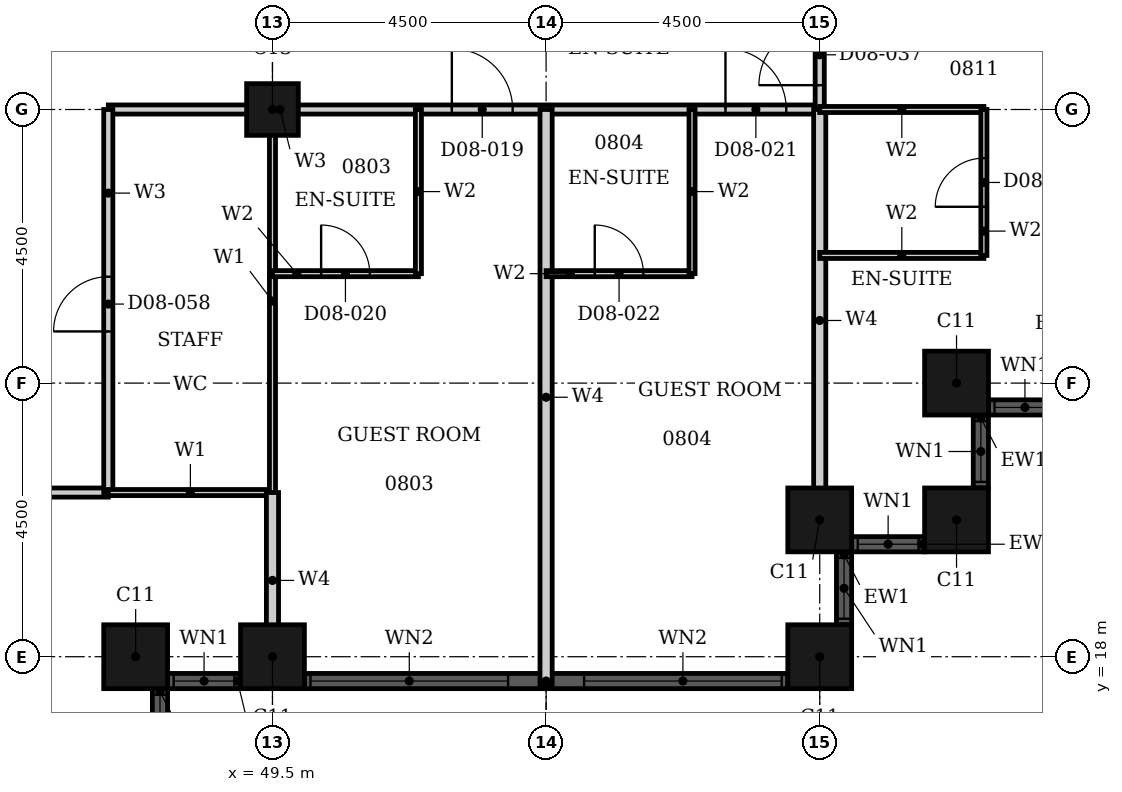
"""IFC4 building model, lengths in metres.
Left out: names, types, materials, properties, quantities, classifications, styles, units other than length and angle.
Written with IfcOpenShell. Run it as: python <this file> out.ifc"""

import sys

from ifc_helpers import new_model, si_unit, direction, frame, frame_2d, origin, origin_2d, place, context, subcontext, project, spatial, rectangle, hollow_rectangle, extrude, element, fill, save


model = new_model("IFC4")
c1 = context("Model", 3, precision=1e-05, world=origin(), true_north=direction((0.0, 1.0)))
c2 = subcontext(c1, "Body", "Model", "MODEL_VIEW")
j1 = project(units=[si_unit("LENGTHUNIT", "METRE"), si_unit("PLANEANGLEUNIT", "RADIAN")], contexts=[c1])
p1 = place(None, origin())
s1 = spatial("IfcSite", under=j1, at=p1, CompositionType="ELEMENT")
p2 = place(p1, origin())
s2 = spatial("IfcBuilding", under=s1, at=p2, CompositionType="ELEMENT")
p3 = place(p2, frame((0.0, 0.0, 40.8)))
s3 = spatial("IfcBuildingStorey", under=s2, at=p3, CompositionType="ELEMENT", Elevation=40.8)
for number, where, z_axis, x_axis in (
    (1, (47.25, 18.0, 0.0), (0.0, 0.0, 1.0), (1.0, 0.0, 0.0)),
    (2, (49.5, 18.0, 0.0), (0.0, 0.0, 1.0), (1.0, 0.0, 0.0)),
    (3, (58.5, 18.0, 0.0), (0.0, 0.0, 1.0), (1.0, 0.0, 0.0)),
    (4, (58.5, 20.25, 0.0), (0.0, 0.0, 1.0), (1.0, 0.0, 0.0)),
    (5, (60.75, 20.25, 0.0), (0.0, 0.0, 1.0), (1.0, 0.0, 0.0)),
    (6, (60.75, 22.5, 0.0), (0.0, 0.0, 1.0), (1.0, 0.0, 0.0)),
):
    element("IfcColumn", number, at=place(p3, frame(where, z_axis=z_axis, x_axis=x_axis)), inside=s3, PredefinedType="COLUMN", context=c2, shape_type="SweptSolid", body=[
        extrude(hollow_rectangle(XDim=1.05, YDim=1.05, WallThickness=0.034, at=origin_2d()), origin(), (0.0, 0.0, 1.0), 3.6),
    ])
p4 = place(p3, frame((49.5, 27.0, 0.0), z_axis=(0.0, 0.0, 1.0), x_axis=(1.0, 0.0, 0.0)))
e7 = element("IfcColumn", 7, at=p4, inside=s3, PredefinedType="COLUMN", context=c2, shape_type="SweptSolid", body=[
    extrude(hollow_rectangle(XDim=0.85, YDim=0.85, WallThickness=0.026, at=origin_2d()), origin(), (0.0, 0.0, 1.0), 3.6),
])
p5 = place(p3, frame((47.65, 16.275, 0.0), z_axis=(0.0, 0.0, 1.0), x_axis=(0.0, 1.0, 0.0)))
e8 = element("IfcWall", 8, at=p5, inside=s3, PredefinedType="SOLIDWALL", context=c2, shape_type="SweptSolid", body=[
    extrude(rectangle(XDim=1.2, YDim=0.25, at=frame_2d((0.6, 0.0))), origin(), (0.0, 0.0, 1.0), 3.6),
])
p6 = place(p5, frame((0.1, 0.0, 0.9)))
e9 = element("IfcOpeningElement", 9, at=p6, cuts=e8, PredefinedType="OPENING", context=c2, shape_type="SweptSolid", body=[
    extrude(rectangle(XDim=1.0, YDim=2.08, at=frame_2d((0.5, 1.04))), frame((0.0, 0.135, 0.0), z_axis=(0.0, -1.0, 0.0), x_axis=(1.0, 0.0, 0.0)), (0.0, 0.0, 1.0), 0.27),
])
p7 = place(p3, frame((47.775, 17.6, 0.0), z_axis=(0.0, 0.0, 1.0), x_axis=(1.0, 0.0, 0.0)))
e10 = element("IfcWall", 10, at=p7, inside=s3, PredefinedType="SOLIDWALL", context=c2, shape_type="SweptSolid", body=[
    extrude(rectangle(XDim=1.2, YDim=0.25, at=frame_2d((0.6, 0.0))), origin(), (0.0, 0.0, 1.0), 3.6),
])
p8 = place(p7, frame((0.1, 0.0, 0.9)))
e11 = element("IfcOpeningElement", 11, at=p8, cuts=e10, PredefinedType="OPENING", context=c2, shape_type="SweptSolid", body=[
    extrude(rectangle(XDim=1.0, YDim=2.08, at=frame_2d((0.5, 1.04))), frame((0.0, 0.135, 0.0), z_axis=(0.0, -1.0, 0.0), x_axis=(1.0, 0.0, 0.0)), (0.0, 0.0, 1.0), 0.27),
])
p9 = place(p3, frame((50.025, 17.6, 0.0), z_axis=(0.0, 0.0, 1.0), x_axis=(1.0, 0.0, 0.0)))
e12 = element("IfcWall", 12, at=p9, inside=s3, PredefinedType="SOLIDWALL", context=c2, shape_type="SweptSolid", body=[
    extrude(rectangle(XDim=7.95, YDim=0.25, at=frame_2d((3.975, 0.0))), origin(), (0.0, 0.0, 1.0), 3.6),
])
p10 = place(p9, frame((0.1, 0.0, 0.9)))
e13 = element("IfcOpeningElement", 13, at=p10, cuts=e12, PredefinedType="OPENING", context=c2, shape_type="SweptSolid", body=[
    extrude(rectangle(XDim=3.25, YDim=2.08, at=frame_2d((1.625, 1.04))), frame((0.0, 0.135, 0.0), z_axis=(0.0, -1.0, 0.0), x_axis=(1.0, 0.0, 0.0)), (0.0, 0.0, 1.0), 0.27),
])
p11 = place(p9, frame((4.6, 0.0, 0.9)))
e14 = element("IfcOpeningElement", 14, at=p11, cuts=e12, PredefinedType="OPENING", context=c2, shape_type="SweptSolid", body=[
    extrude(rectangle(XDim=3.25, YDim=2.08, at=frame_2d((1.625, 1.04))), frame((0.0, 0.135, 0.0), z_axis=(0.0, -1.0, 0.0), x_axis=(1.0, 0.0, 0.0)), (0.0, 0.0, 1.0), 0.27),
])
p12 = place(p3, frame((58.9, 18.525, 0.0), z_axis=(0.0, 0.0, 1.0), x_axis=(0.0, 1.0, 0.0)))
e15 = element("IfcWall", 15, at=p12, inside=s3, PredefinedType="SOLIDWALL", context=c2, shape_type="SweptSolid", body=[
    extrude(rectangle(XDim=1.2, YDim=0.25, at=frame_2d((0.6, 0.0))), origin(), (0.0, 0.0, 1.0), 3.6),
])
p13 = place(p12, frame((0.1, 0.0, 0.9)))
e16 = element("IfcOpeningElement", 16, at=p13, cuts=e15, PredefinedType="OPENING", context=c2, shape_type="SweptSolid", body=[
    extrude(rectangle(XDim=1.0, YDim=2.08, at=frame_2d((0.5, 1.04))), frame((0.0, 0.135, 0.0), z_axis=(0.0, -1.0, 0.0), x_axis=(1.0, 0.0, 0.0)), (0.0, 0.0, 1.0), 0.27),
])
p14 = place(p3, frame((59.025, 19.85, 0.0), z_axis=(0.0, 0.0, 1.0), x_axis=(1.0, 0.0, 0.0)))
e17 = element("IfcWall", 17, at=p14, inside=s3, PredefinedType="SOLIDWALL", context=c2, shape_type="SweptSolid", body=[
    extrude(rectangle(XDim=1.2, YDim=0.25, at=frame_2d((0.6, 0.0))), origin(), (0.0, 0.0, 1.0), 3.6),
])
p15 = place(p14, frame((0.1, 0.0, 0.9)))
e18 = element("IfcOpeningElement", 18, at=p15, cuts=e17, PredefinedType="OPENING", context=c2, shape_type="SweptSolid", body=[
    extrude(rectangle(XDim=1.0, YDim=2.08, at=frame_2d((0.5, 1.04))), frame((0.0, 0.135, 0.0), z_axis=(0.0, -1.0, 0.0), x_axis=(1.0, 0.0, 0.0)), (0.0, 0.0, 1.0), 0.27),
])
p16 = place(p3, frame((61.15, 20.775, 0.0), z_axis=(0.0, 0.0, 1.0), x_axis=(0.0, 1.0, 0.0)))
e19 = element("IfcWall", 19, at=p16, inside=s3, PredefinedType="SOLIDWALL", context=c2, shape_type="SweptSolid", body=[
    extrude(rectangle(XDim=1.2, YDim=0.25, at=frame_2d((0.6, 0.0))), origin(), (0.0, 0.0, 1.0), 3.6),
])
p17 = place(p16, frame((0.1, 0.0, 0.9)))
e20 = element("IfcOpeningElement", 20, at=p17, cuts=e19, PredefinedType="OPENING", context=c2, shape_type="SweptSolid", body=[
    extrude(rectangle(XDim=1.0, YDim=2.08, at=frame_2d((0.5, 1.04))), frame((0.0, 0.135, 0.0), z_axis=(0.0, -1.0, 0.0), x_axis=(1.0, 0.0, 0.0)), (0.0, 0.0, 1.0), 0.27),
])
p18 = place(p3, frame((61.275, 22.1, 0.0), z_axis=(0.0, 0.0, 1.0), x_axis=(1.0, 0.0, 0.0)))
e21 = element("IfcWall", 21, at=p18, inside=s3, PredefinedType="SOLIDWALL", context=c2, shape_type="SweptSolid", body=[
    extrude(rectangle(XDim=1.2, YDim=0.25, at=frame_2d((0.6, 0.0))), origin(), (0.0, 0.0, 1.0), 3.6),
])
p19 = place(p18, frame((0.1, 0.0, 0.9)))
e22 = element("IfcOpeningElement", 22, at=p19, cuts=e21, PredefinedType="OPENING", context=c2, shape_type="SweptSolid", body=[
    extrude(rectangle(XDim=1.0, YDim=2.08, at=frame_2d((0.5, 1.04))), frame((0.0, 0.135, 0.0), z_axis=(0.0, -1.0, 0.0), x_axis=(1.0, 0.0, 0.0)), (0.0, 0.0, 1.0), 0.27),
])
p20 = place(p3, frame((31.5, 20.7, 0.0), z_axis=(0.0, 0.0, 1.0), x_axis=(1.0, 0.0, 0.0)))
e23 = element("IfcWall", 23, at=p20, inside=s3, PredefinedType="PARTITIONING", context=c2, shape_type="SweptSolid", body=[
    extrude(rectangle(XDim=15.3, YDim=0.15, at=frame_2d((7.65, 0.0))), origin(), (0.0, 0.0, 1.0), 3.3),
])
p21 = place(p20, frame((11.95, 0.0, 0.0)))
e24 = element("IfcOpeningElement", 24, at=p21, cuts=e23, PredefinedType="OPENING", context=c2, shape_type="SweptSolid", body=[
    extrude(rectangle(XDim=1.0, YDim=2.1, at=frame_2d((0.5, 1.05))), frame((0.0, 0.085, 0.0), z_axis=(0.0, -1.0, 0.0), x_axis=(1.0, 0.0, 0.0)), (0.0, 0.0, 1.0), 0.17),
])
p22 = place(p20, frame((1.05, 0.0, 0.0)))
e25 = element("IfcOpeningElement", 25, at=p22, cuts=e23, PredefinedType="OPENING", context=c2, shape_type="SweptSolid", body=[
    extrude(rectangle(XDim=0.9, YDim=2.1, at=frame_2d((0.45, 1.05))), frame((0.0, 0.085, 0.0), z_axis=(0.0, -1.0, 0.0), x_axis=(1.0, 0.0, 0.0)), (0.0, 0.0, 1.0), 0.17),
])
p23 = place(p20, frame((5.55, 0.0, 0.0)))
e26 = element("IfcOpeningElement", 26, at=p23, cuts=e23, PredefinedType="OPENING", context=c2, shape_type="SweptSolid", body=[
    extrude(rectangle(XDim=0.9, YDim=2.1, at=frame_2d((0.45, 1.05))), frame((0.0, 0.085, 0.0), z_axis=(0.0, -1.0, 0.0), x_axis=(1.0, 0.0, 0.0)), (0.0, 0.0, 1.0), 0.17),
])
p24 = place(p3, frame((46.8, 27.0, 0.0), z_axis=(0.0, 0.0, 1.0), x_axis=(1.0, 0.0, 0.0)))
e27 = element("IfcWall", 27, at=p24, inside=s3, PredefinedType="PARTITIONING", context=c2, shape_type="SweptSolid", body=[
    extrude(rectangle(XDim=11.7, YDim=0.15, at=frame_2d((5.85, 0.0))), origin(), (0.0, 0.0, 1.0), 2.58),
])
p25 = place(p24, frame((5.65, 0.0, 0.0)))
e28 = element("IfcOpeningElement", 28, at=p25, cuts=e27, PredefinedType="OPENING", context=c2, shape_type="SweptSolid", body=[
    extrude(rectangle(XDim=1.0, YDim=2.1, at=frame_2d((0.5, 1.05))), frame((0.0, 0.085, 0.0), z_axis=(0.0, -1.0, 0.0), x_axis=(1.0, 0.0, 0.0)), (0.0, 0.0, 1.0), 0.17),
])
p26 = place(p24, frame((10.15, 0.0, 0.0)))
e29 = element("IfcOpeningElement", 29, at=p26, cuts=e27, PredefinedType="OPENING", context=c2, shape_type="SweptSolid", body=[
    extrude(rectangle(XDim=1.0, YDim=2.1, at=frame_2d((0.5, 1.05))), frame((0.0, 0.085, 0.0), z_axis=(0.0, -1.0, 0.0), x_axis=(1.0, 0.0, 0.0)), (0.0, 0.0, 1.0), 0.17),
])
p27 = place(p3, frame((46.8, 20.7, 0.0), z_axis=(0.0, 0.0, 1.0), x_axis=(0.0, 1.0, 0.0)))
e30 = element("IfcWall", 30, at=p27, inside=s3, PredefinedType="PARTITIONING", context=c2, shape_type="SweptSolid", body=[
    extrude(rectangle(XDim=6.3, YDim=0.15, at=frame_2d((3.15, 0.0))), origin(), (0.0, 0.0, 1.0), 3.3),
])
p28 = place(p27, frame((2.65, 0.0, 0.0)))
e31 = element("IfcOpeningElement", 31, at=p28, cuts=e30, PredefinedType="OPENING", context=c2, shape_type="SweptSolid", body=[
    extrude(rectangle(XDim=0.9, YDim=2.1, at=frame_2d((0.45, 1.05))), frame((0.0, 0.085, 0.0), z_axis=(0.0, -1.0, 0.0), x_axis=(1.0, 0.0, 0.0)), (0.0, 0.0, 1.0), 0.17),
])
p29 = place(p3, frame((58.5, 27.0, 0.0), z_axis=(0.0, 0.0, 1.0), x_axis=(0.0, 1.0, 0.0)))
e32 = element("IfcWall", 32, at=p29, inside=s3, PredefinedType="PARTITIONING", context=c2, shape_type="SweptSolid", body=[
    extrude(rectangle(XDim=1.8, YDim=0.15, at=frame_2d((0.9, 0.0))), origin(), (0.0, 0.0, 1.0), 3.3),
])
p30 = place(p29, frame((0.4, 0.0, 0.0)))
e33 = element("IfcOpeningElement", 33, at=p30, cuts=e32, PredefinedType="OPENING", context=c2, shape_type="SweptSolid", body=[
    extrude(rectangle(XDim=1.0, YDim=2.1, at=frame_2d((0.5, 1.05))), frame((0.0, 0.085, 0.0), z_axis=(0.0, -1.0, 0.0), x_axis=(1.0, 0.0, 0.0)), (0.0, 0.0, 1.0), 0.17),
])
p31 = place(p3, frame((46.8, 20.7, 0.0), z_axis=(0.0, 0.0, 1.0), x_axis=(1.0, 0.0, 0.0)))
e34 = element("IfcWall", 34, at=p31, inside=s3, PredefinedType="PARTITIONING", context=c2, shape_type="SweptSolid", body=[
    extrude(rectangle(XDim=2.7, YDim=0.1, at=frame_2d((1.35, 0.0))), origin(), (0.0, 0.0, 1.0), 3.3),
])
p32 = place(p3, frame((49.5, 20.7, 0.0), z_axis=(0.0, 0.0, 1.0), x_axis=(0.0, 1.0, 0.0)))
e35 = element("IfcWall", 35, at=p32, inside=s3, PredefinedType="PARTITIONING", context=c2, shape_type="SweptSolid", body=[
    extrude(rectangle(XDim=6.3, YDim=0.1, at=frame_2d((3.15, 0.0))), origin(), (0.0, 0.0, 1.0), 2.38),
])
p33 = place(p3, frame((49.5, 17.81, 0.0), z_axis=(0.0, 0.0, 1.0), x_axis=(0.0, 1.0, 0.0)))
e36 = element("IfcWall", 36, at=p33, inside=s3, PredefinedType="PARTITIONING", context=c2, shape_type="SweptSolid", body=[
    extrude(rectangle(XDim=2.89, YDim=0.2, at=frame_2d((1.445, 0.0))), origin(), (0.0, 0.0, 1.0), 2.38),
])
p34 = place(p3, frame((54.0, 17.535, 0.0), z_axis=(0.0, 0.0, 1.0), x_axis=(0.0, 1.0, 0.0)))
e37 = element("IfcWall", 37, at=p34, inside=s3, PredefinedType="PARTITIONING", context=c2, shape_type="SweptSolid", body=[
    extrude(rectangle(XDim=9.465, YDim=0.2, at=frame_2d((4.732, 0.0))), origin(), (0.0, 0.0, 1.0), 3.3),
])
p35 = place(p3, frame((58.5, 20.06, 0.0), z_axis=(0.0, 0.0, 1.0), x_axis=(0.0, 1.0, 0.0)))
e38 = element("IfcWall", 38, at=p35, inside=s3, PredefinedType="PARTITIONING", context=c2, shape_type="SweptSolid", body=[
    extrude(rectangle(XDim=6.94, YDim=0.2, at=frame_2d((3.47, 0.0))), origin(), (0.0, 0.0, 1.0), 3.3),
])
p36 = place(p3, frame((49.5, 24.3, 0.0), z_axis=(0.0, 0.0, 1.0), x_axis=(1.0, 0.0, 0.0)))
e39 = element("IfcWall", 39, at=p36, inside=s3, PredefinedType="PARTITIONING", context=c2, shape_type="SweptSolid", body=[
    extrude(rectangle(XDim=2.4, YDim=0.1, at=frame_2d((1.2, 0.0))), origin(), (0.0, 0.0, 1.0), 3.3),
])
p37 = place(p36, frame((0.8, 0.0, 0.0)))
e40 = element("IfcOpeningElement", 40, at=p37, cuts=e39, PredefinedType="OPENING", context=c2, shape_type="SweptSolid", body=[
    extrude(rectangle(XDim=0.8, YDim=2.1, at=frame_2d((0.4, 1.05))), frame((0.0, 0.06, 0.0), z_axis=(0.0, -1.0, 0.0), x_axis=(1.0, 0.0, 0.0)), (0.0, 0.0, 1.0), 0.12),
])
p38 = place(p3, frame((54.0, 24.3, 0.0), z_axis=(0.0, 0.0, 1.0), x_axis=(1.0, 0.0, 0.0)))
e41 = element("IfcWall", 41, at=p38, inside=s3, PredefinedType="PARTITIONING", context=c2, shape_type="SweptSolid", body=[
    extrude(rectangle(XDim=2.4, YDim=0.1, at=frame_2d((1.2, 0.0))), origin(), (0.0, 0.0, 1.0), 3.3),
])
p39 = place(p38, frame((0.8, 0.0, 0.0)))
e42 = element("IfcOpeningElement", 42, at=p39, cuts=e41, PredefinedType="OPENING", context=c2, shape_type="SweptSolid", body=[
    extrude(rectangle(XDim=0.8, YDim=2.1, at=frame_2d((0.4, 1.05))), frame((0.0, 0.06, 0.0), z_axis=(0.0, -1.0, 0.0), x_axis=(1.0, 0.0, 0.0)), (0.0, 0.0, 1.0), 0.12),
])
p40 = place(p3, frame((58.5, 24.6, 0.0), z_axis=(0.0, 0.0, 1.0), x_axis=(1.0, 0.0, 0.0)))
e43 = element("IfcWall", 43, at=p40, inside=s3, PredefinedType="PARTITIONING", context=c2, shape_type="SweptSolid", body=[
    extrude(rectangle(XDim=2.7, YDim=0.1, at=frame_2d((1.35, 0.0))), origin(), (0.0, 0.0, 1.0), 3.3),
])
p41 = place(p3, frame((58.5, 27.0, 0.0), z_axis=(0.0, 0.0, 1.0), x_axis=(1.0, 0.0, 0.0)))
e44 = element("IfcWall", 44, at=p41, inside=s3, PredefinedType="PARTITIONING", context=c2, shape_type="SweptSolid", body=[
    extrude(rectangle(XDim=2.7, YDim=0.1, at=frame_2d((1.35, 0.0))), origin(), (0.0, 0.0, 1.0), 2.58),
])
for number, where, z_axis, x_axis in (
    (45, (51.9, 24.3, 0.0), (0.0, 0.0, 1.0), (0.0, 1.0, 0.0)),
    (46, (56.4, 24.3, 0.0), (0.0, 0.0, 1.0), (0.0, 1.0, 0.0)),
):
    element("IfcWall", number, at=place(p3, frame(where, z_axis=z_axis, x_axis=x_axis)), inside=s3, PredefinedType="PARTITIONING", context=c2, shape_type="SweptSolid", body=[
        extrude(rectangle(XDim=2.7, YDim=0.1, at=frame_2d((1.35, 0.0))), origin(), (0.0, 0.0, 1.0), 3.3),
    ])
p42 = place(p3, frame((61.2, 24.6, 0.0), z_axis=(0.0, 0.0, 1.0), x_axis=(0.0, 1.0, 0.0)))
e47 = element("IfcWall", 47, at=p42, inside=s3, PredefinedType="PARTITIONING", context=c2, shape_type="SweptSolid", body=[
    extrude(rectangle(XDim=2.4, YDim=0.1, at=frame_2d((1.2, 0.0))), origin(), (0.0, 0.0, 1.0), 3.3),
])
p43 = place(p42, frame((0.8, 0.0, 0.0)))
e48 = element("IfcOpeningElement", 48, at=p43, cuts=e47, PredefinedType="OPENING", context=c2, shape_type="SweptSolid", body=[
    extrude(rectangle(XDim=0.8, YDim=2.1, at=frame_2d((0.4, 1.05))), frame((0.0, 0.06, 0.0), z_axis=(0.0, -1.0, 0.0), x_axis=(1.0, 0.0, 0.0)), (0.0, 0.0, 1.0), 0.12),
])
p44 = place(p6, origin())
e49 = element("IfcWindow", 49, at=p44, inside=s3, PartitioningType="SINGLE_PANEL", PredefinedType="WINDOW", context=c2, shape_type="SweptSolid", body=[
    extrude(rectangle(XDim=1.0, YDim=2.08, at=frame_2d((0.5, 1.04))), frame((0.0, 0.03, 0.0), z_axis=(0.0, -1.0, 0.0), x_axis=(1.0, 0.0, 0.0)), (0.0, 0.0, 1.0), 0.06),
])
fill(e9, e49)
p45 = place(p8, origin())
e50 = element("IfcWindow", 50, at=p45, inside=s3, PartitioningType="SINGLE_PANEL", PredefinedType="WINDOW", context=c2, shape_type="SweptSolid", body=[
    extrude(rectangle(XDim=1.0, YDim=2.08, at=frame_2d((0.5, 1.04))), frame((0.0, 0.03, 0.0), z_axis=(0.0, -1.0, 0.0), x_axis=(1.0, 0.0, 0.0)), (0.0, 0.0, 1.0), 0.06),
])
fill(e11, e50)
p46 = place(p10, origin())
e51 = element("IfcWindow", 51, at=p46, inside=s3, PartitioningType="SINGLE_PANEL", PredefinedType="WINDOW", context=c2, shape_type="SweptSolid", body=[
    extrude(rectangle(XDim=3.25, YDim=2.08, at=frame_2d((1.625, 1.04))), frame((0.0, 0.03, 0.0), z_axis=(0.0, -1.0, 0.0), x_axis=(1.0, 0.0, 0.0)), (0.0, 0.0, 1.0), 0.06),
])
fill(e13, e51)
p47 = place(p11, origin())
e52 = element("IfcWindow", 52, at=p47, inside=s3, PartitioningType="SINGLE_PANEL", PredefinedType="WINDOW", context=c2, shape_type="SweptSolid", body=[
    extrude(rectangle(XDim=3.25, YDim=2.08, at=frame_2d((1.625, 1.04))), frame((0.0, 0.03, 0.0), z_axis=(0.0, -1.0, 0.0), x_axis=(1.0, 0.0, 0.0)), (0.0, 0.0, 1.0), 0.06),
])
fill(e14, e52)
p48 = place(p13, origin())
e53 = element("IfcWindow", 53, at=p48, inside=s3, PartitioningType="SINGLE_PANEL", PredefinedType="WINDOW", context=c2, shape_type="SweptSolid", body=[
    extrude(rectangle(XDim=1.0, YDim=2.08, at=frame_2d((0.5, 1.04))), frame((0.0, 0.03, 0.0), z_axis=(0.0, -1.0, 0.0), x_axis=(1.0, 0.0, 0.0)), (0.0, 0.0, 1.0), 0.06),
])
fill(e16, e53)
p49 = place(p15, origin())
e54 = element("IfcWindow", 54, at=p49, inside=s3, PartitioningType="SINGLE_PANEL", PredefinedType="WINDOW", context=c2, shape_type="SweptSolid", body=[
    extrude(rectangle(XDim=1.0, YDim=2.08, at=frame_2d((0.5, 1.04))), frame((0.0, 0.03, 0.0), z_axis=(0.0, -1.0, 0.0), x_axis=(1.0, 0.0, 0.0)), (0.0, 0.0, 1.0), 0.06),
])
fill(e18, e54)
p50 = place(p17, origin())
e55 = element("IfcWindow", 55, at=p50, inside=s3, PartitioningType="SINGLE_PANEL", PredefinedType="WINDOW", context=c2, shape_type="SweptSolid", body=[
    extrude(rectangle(XDim=1.0, YDim=2.08, at=frame_2d((0.5, 1.04))), frame((0.0, 0.03, 0.0), z_axis=(0.0, -1.0, 0.0), x_axis=(1.0, 0.0, 0.0)), (0.0, 0.0, 1.0), 0.06),
])
fill(e20, e55)
p51 = place(p19, origin())
e56 = element("IfcWindow", 56, at=p51, inside=s3, PartitioningType="SINGLE_PANEL", PredefinedType="WINDOW", context=c2, shape_type="SweptSolid", body=[
    extrude(rectangle(XDim=1.0, YDim=2.08, at=frame_2d((0.5, 1.04))), frame((0.0, 0.03, 0.0), z_axis=(0.0, -1.0, 0.0), x_axis=(1.0, 0.0, 0.0)), (0.0, 0.0, 1.0), 0.06),
])
fill(e22, e56)
p52 = place(p25, origin())
e57 = element("IfcDoor", 57, at=p52, inside=s3, OperationType="SINGLE_SWING_RIGHT", PredefinedType="DOOR", context=c2, shape_type="SweptSolid", body=[
    extrude(rectangle(XDim=1.0, YDim=2.1, at=frame_2d((0.5, 1.05))), frame((0.0, 0.025, 0.0), z_axis=(0.0, -1.0, 0.0), x_axis=(1.0, 0.0, 0.0)), (0.0, 0.0, 1.0), 0.05),
])
fill(e28, e57)
p53 = place(p37, origin())
e58 = element("IfcDoor", 58, at=p53, inside=s3, OperationType="SINGLE_SWING_RIGHT", PredefinedType="DOOR", context=c2, shape_type="SweptSolid", body=[
    extrude(rectangle(XDim=0.8, YDim=2.1, at=frame_2d((0.4, 1.05))), frame((0.0, 0.025, 0.0), z_axis=(0.0, -1.0, 0.0), x_axis=(1.0, 0.0, 0.0)), (0.0, 0.0, 1.0), 0.05),
])
fill(e40, e58)
p54 = place(p26, origin())
e59 = element("IfcDoor", 59, at=p54, inside=s3, OperationType="SINGLE_SWING_RIGHT", PredefinedType="DOOR", context=c2, shape_type="SweptSolid", body=[
    extrude(rectangle(XDim=1.0, YDim=2.1, at=frame_2d((0.5, 1.05))), frame((0.0, 0.025, 0.0), z_axis=(0.0, -1.0, 0.0), x_axis=(1.0, 0.0, 0.0)), (0.0, 0.0, 1.0), 0.05),
])
fill(e29, e59)
p55 = place(p39, origin())
e60 = element("IfcDoor", 60, at=p55, inside=s3, OperationType="SINGLE_SWING_RIGHT", PredefinedType="DOOR", context=c2, shape_type="SweptSolid", body=[
    extrude(rectangle(XDim=0.8, YDim=2.1, at=frame_2d((0.4, 1.05))), frame((0.0, 0.025, 0.0), z_axis=(0.0, -1.0, 0.0), x_axis=(1.0, 0.0, 0.0)), (0.0, 0.0, 1.0), 0.05),
])
fill(e42, e60)
p56 = place(p30, origin())
e61 = element("IfcDoor", 61, at=p56, inside=s3, OperationType="SINGLE_SWING_RIGHT", PredefinedType="DOOR", context=c2, shape_type="SweptSolid", body=[
    extrude(rectangle(XDim=1.0, YDim=2.1, at=frame_2d((0.5, 1.05))), frame((0.0, 0.025, 0.0), z_axis=(0.0, -1.0, 0.0), x_axis=(1.0, 0.0, 0.0)), (0.0, 0.0, 1.0), 0.05),
])
fill(e33, e61)
p57 = place(p43, origin())
e62 = element("IfcDoor", 62, at=p57, inside=s3, OperationType="SINGLE_SWING_LEFT", PredefinedType="DOOR", context=c2, shape_type="SweptSolid", body=[
    extrude(rectangle(XDim=0.8, YDim=2.1, at=frame_2d((0.4, 1.05))), frame((0.0, 0.025, 0.0), z_axis=(0.0, -1.0, 0.0), x_axis=(1.0, 0.0, 0.0)), (0.0, 0.0, 1.0), 0.05),
])
fill(e48, e62)
p58 = place(p28, origin())
e63 = element("IfcDoor", 63, at=p58, inside=s3, OperationType="SINGLE_SWING_LEFT", PredefinedType="DOOR", context=c2, shape_type="SweptSolid", body=[
    extrude(rectangle(XDim=0.9, YDim=2.1, at=frame_2d((0.45, 1.05))), frame((0.0, 0.025, 0.0), z_axis=(0.0, -1.0, 0.0), x_axis=(1.0, 0.0, 0.0)), (0.0, 0.0, 1.0), 0.05),
])
fill(e31, e63)
save(model, sys.argv[1])
